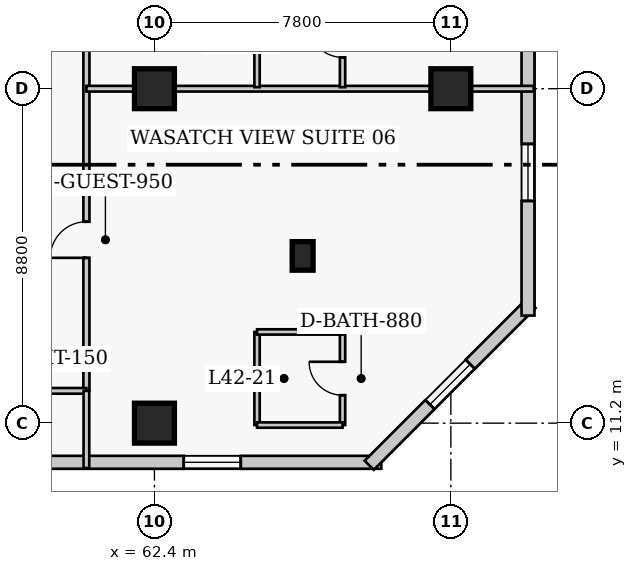
"""IFC4 building model, lengths in metres.
Left out: names, types, materials, properties, quantities, classifications, styles, units other than length and angle.
Written with IfcOpenShell. Run it as: python <this file> out.ifc"""

import sys

from ifc_helpers import new_model, si_unit, direction, frame, frame_2d, origin, origin_2d, place, context, subcontext, project, spatial, rectangle, extrude, element, fill, save


model = new_model("IFC4")
c1 = context("Model", 3, precision=1e-05, world=origin(), true_north=direction((0.0, 1.0)))
c2 = subcontext(c1, "Body", "Model", "MODEL_VIEW")
j1 = project(units=[si_unit("LENGTHUNIT", "METRE"), si_unit("PLANEANGLEUNIT", "RADIAN")], contexts=[c1])
p1 = place(None, origin())
s1 = spatial("IfcSite", under=j1, at=p1, CompositionType="ELEMENT")
p2 = place(p1, origin())
s2 = spatial("IfcBuilding", under=s1, at=p2, CompositionType="ELEMENT")
p3 = place(p2, frame((0.0, 0.0, 168.8)))
s3 = spatial("IfcBuildingStorey", under=s2, at=p3, CompositionType="ELEMENT", Elevation=168.8)
for number, where, z_axis, x_axis in (
    (1, (62.4, 11.2, 0.0), (0.0, 0.0, 1.0), (1.0, 0.0, 0.0)),
    (2, (62.4, 20.0, 0.0), (0.0, 0.0, 1.0), (1.0, 0.0, 0.0)),
    (3, (70.2, 20.0, 0.0), (0.0, 0.0, 1.0), (1.0, 0.0, 0.0)),
):
    element("IfcColumn", number, at=place(p3, frame(where, z_axis=z_axis, x_axis=x_axis)), inside=s3, PredefinedType="COLUMN", context=c2, shape_type="SweptSolid", body=[
        extrude(rectangle(XDim=1.05, YDim=1.05, at=origin_2d()), origin(), (0.0, 0.0, 1.0), 3.8),
    ])
p4 = place(p3, frame((66.3, 15.6, 0.0), z_axis=(0.0, 0.0, 1.0), x_axis=(1.0, 0.0, 0.0)))
e4 = element("IfcColumn", 4, at=p4, inside=s3, PredefinedType="PILASTER", context=c2, shape_type="SweptSolid", body=[
    extrude(rectangle(XDim=0.55, YDim=0.75, at=origin_2d()), origin(), (0.0, 0.0, 1.0), 3.8),
])
p5 = place(p3, frame((41.68, 10.17, 0.0), z_axis=(0.0, 0.0, 1.0), x_axis=(1.0, 0.0, 0.0)))
e5 = element("IfcWall", 5, at=p5, inside=s3, PredefinedType="SOLIDWALL", context=c2, shape_type="SweptSolid", body=[
    extrude(rectangle(XDim=26.69, YDim=0.34, at=frame_2d((13.345, 0.0))), origin(), (0.0, 0.0, 1.0), 3.55),
])
p6 = place(p5, frame((2.548, 0.0, 0.85)))
e6 = element("IfcOpeningElement", 6, at=p6, cuts=e5, PredefinedType="OPENING", context=c2, shape_type="SweptSolid", body=[
    extrude(rectangle(XDim=1.5, YDim=1.75, at=frame_2d((0.75, 0.875))), frame((0.0, 0.18, 0.0), z_axis=(0.0, -1.0, 0.0), x_axis=(1.0, 0.0, 0.0)), (0.0, 0.0, 1.0), 0.36),
])
p7 = place(p5, frame((13.745, 0.0, 0.85)))
e7 = element("IfcOpeningElement", 7, at=p7, cuts=e5, PredefinedType="OPENING", context=c2, shape_type="SweptSolid", body=[
    extrude(rectangle(XDim=1.5, YDim=1.75, at=frame_2d((0.75, 0.875))), frame((0.0, 0.18, 0.0), z_axis=(0.0, -1.0, 0.0), x_axis=(1.0, 0.0, 0.0)), (0.0, 0.0, 1.0), 0.36),
])
p8 = place(p5, frame((21.492, 0.0, 0.85)))
e8 = element("IfcOpeningElement", 8, at=p8, cuts=e5, PredefinedType="OPENING", context=c2, shape_type="SweptSolid", body=[
    extrude(rectangle(XDim=1.5, YDim=1.75, at=frame_2d((0.75, 0.875))), frame((0.0, 0.18, 0.0), z_axis=(0.0, -1.0, 0.0), x_axis=(1.0, 0.0, 0.0)), (0.0, 0.0, 1.0), 0.36),
])
p9 = place(p3, frame((68.052, 10.092, 0.0), z_axis=(0.0, 0.0, 1.0), x_axis=(0.707106781187, 0.707106781187, 0.0)))
e9 = element("IfcWall", 9, at=p9, inside=s3, PredefinedType="SOLIDWALL", context=c2, shape_type="SweptSolid", body=[
    extrude(rectangle(XDim=6.02, YDim=0.34, at=frame_2d((3.01, 0.0))), origin(), (0.0, 0.0, 1.0), 3.55),
])
p10 = place(p9, frame((2.26, 0.0, 0.85)))
e10 = element("IfcOpeningElement", 10, at=p10, cuts=e9, PredefinedType="OPENING", context=c2, shape_type="SweptSolid", body=[
    extrude(rectangle(XDim=1.5, YDim=1.75, at=frame_2d((0.75, 0.875))), frame((0.0, 0.18, 0.0), z_axis=(0.0, -1.0, 0.0), x_axis=(1.0, 0.0, 0.0)), (0.0, 0.0, 1.0), 0.36),
])
p11 = place(p3, frame((72.23, 14.03, 0.0), z_axis=(0.0, 0.0, 1.0), x_axis=(0.0, 1.0, 0.0)))
e11 = element("IfcWall", 11, at=p11, inside=s3, PredefinedType="SOLIDWALL", context=c2, shape_type="SweptSolid", body=[
    extrude(rectangle(XDim=30.14, YDim=0.34, at=frame_2d((15.07, 0.0))), origin(), (0.0, 0.0, 1.0), 3.55),
])
p12 = place(p11, frame((3.018, 0.0, 0.85)))
e12 = element("IfcOpeningElement", 12, at=p12, cuts=e11, PredefinedType="OPENING", context=c2, shape_type="SweptSolid", body=[
    extrude(rectangle(XDim=1.5, YDim=1.75, at=frame_2d((0.75, 0.875))), frame((0.0, 0.18, 0.0), z_axis=(0.0, -1.0, 0.0), x_axis=(1.0, 0.0, 0.0)), (0.0, 0.0, 1.0), 0.36),
])
p13 = place(p11, frame((10.552, 0.0, 0.85)))
e13 = element("IfcOpeningElement", 13, at=p13, cuts=e11, PredefinedType="OPENING", context=c2, shape_type="SweptSolid", body=[
    extrude(rectangle(XDim=1.5, YDim=1.75, at=frame_2d((0.75, 0.875))), frame((0.0, 0.18, 0.0), z_axis=(0.0, -1.0, 0.0), x_axis=(1.0, 0.0, 0.0)), (0.0, 0.0, 1.0), 0.36),
])
p14 = place(p11, frame((18.087, 0.0, 0.85)))
e14 = element("IfcOpeningElement", 14, at=p14, cuts=e11, PredefinedType="OPENING", context=c2, shape_type="SweptSolid", body=[
    extrude(rectangle(XDim=1.5, YDim=1.75, at=frame_2d((0.75, 0.875))), frame((0.0, 0.18, 0.0), z_axis=(0.0, -1.0, 0.0), x_axis=(1.0, 0.0, 0.0)), (0.0, 0.0, 1.0), 0.36),
])
p15 = place(p11, frame((25.623, 0.0, 0.85)))
e15 = element("IfcOpeningElement", 15, at=p15, cuts=e11, PredefinedType="OPENING", context=c2, shape_type="SweptSolid", body=[
    extrude(rectangle(XDim=1.5, YDim=1.75, at=frame_2d((0.75, 0.875))), frame((0.0, 0.18, 0.0), z_axis=(0.0, -1.0, 0.0), x_axis=(1.0, 0.0, 0.0)), (0.0, 0.0, 1.0), 0.36),
])
p16 = place(p3, frame((60.61, 12.05, 0.0), z_axis=(0.0, 0.0, 1.0), x_axis=(0.0, 1.0, 0.0)))
e16 = element("IfcWall", 16, at=p16, inside=s3, PredefinedType="PARTITIONING", context=c2, shape_type="SweptSolid", body=[
    extrude(rectangle(XDim=28.6, YDim=0.16, at=frame_2d((14.3, 0.0))), origin(), (0.0, 0.0, 1.0), 3.55),
])
p17 = place(p16, frame((3.5, 0.0, 0.0)))
e17 = element("IfcOpeningElement", 17, at=p17, cuts=e16, PredefinedType="OPENING", context=c2, shape_type="SweptSolid", body=[
    extrude(rectangle(XDim=0.95, YDim=2.1, at=frame_2d((0.475, 1.05))), frame((0.0, 0.09, 0.0), z_axis=(0.0, -1.0, 0.0), x_axis=(1.0, 0.0, 0.0)), (0.0, 0.0, 1.0), 0.18),
])
p18 = place(p16, frame((11.875, 0.0, 0.0)))
e18 = element("IfcOpeningElement", 18, at=p18, cuts=e16, PredefinedType="OPENING", context=c2, shape_type="SweptSolid", body=[
    extrude(rectangle(XDim=0.95, YDim=2.1, at=frame_2d((0.475, 1.05))), frame((0.0, 0.09, 0.0), z_axis=(0.0, -1.0, 0.0), x_axis=(1.0, 0.0, 0.0)), (0.0, 0.0, 1.0), 0.18),
])
p19 = place(p16, frame((20.325, 0.0, 0.0)))
e19 = element("IfcOpeningElement", 19, at=p19, cuts=e16, PredefinedType="OPENING", context=c2, shape_type="SweptSolid", body=[
    extrude(rectangle(XDim=0.95, YDim=2.1, at=frame_2d((0.475, 1.05))), frame((0.0, 0.09, 0.0), z_axis=(0.0, -1.0, 0.0), x_axis=(1.0, 0.0, 0.0)), (0.0, 0.0, 1.0), 0.18),
])
p20 = place(p16, frame((27.16, 0.0, 0.0)))
e20 = element("IfcOpeningElement", 20, at=p20, cuts=e16, PredefinedType="OPENING", context=c2, shape_type="SweptSolid", body=[
    extrude(rectangle(XDim=1.0, YDim=2.15, at=frame_2d((0.5, 1.075))), frame((0.0, 0.09, 0.0), z_axis=(0.0, -1.0, 0.0), x_axis=(1.0, 0.0, 0.0)), (0.0, 0.0, 1.0), 0.18),
])
p21 = place(p3, frame((58.39, 12.05, 0.0), z_axis=(0.0, 0.0, 1.0), x_axis=(1.0, 0.0, 0.0)))
e21 = element("IfcWall", 21, at=p21, inside=s3, PredefinedType="PARTITIONING", context=c2, shape_type="SweptSolid", body=[
    extrude(rectangle(XDim=2.22, YDim=0.15, at=frame_2d((1.11, 0.0))), origin(), (0.0, 0.0, 1.0), 3.55),
])
p22 = place(p3, frame((60.61, 10.02, 0.0), z_axis=(0.0, 0.0, 1.0), x_axis=(0.0, 1.0, 0.0)))
e22 = element("IfcWall", 22, at=p22, inside=s3, PredefinedType="PARTITIONING", context=c2, shape_type="SweptSolid", body=[
    extrude(rectangle(XDim=2.03, YDim=0.15, at=frame_2d((1.015, 0.0))), origin(), (0.0, 0.0, 1.0), 3.55),
])
p23 = place(p3, frame((65.1, 11.15, 0.0), z_axis=(0.0, 0.0, 1.0), x_axis=(0.0, 1.0, 0.0)))
e23 = element("IfcWall", 23, at=p23, inside=s3, PredefinedType="PLUMBINGWALL", context=c2, shape_type="SweptSolid", body=[
    extrude(rectangle(XDim=2.45, YDim=0.14, at=frame_2d((1.225, 0.0))), origin(), (0.0, 0.0, 1.0), 3.55),
])
p24 = place(p3, frame((67.35, 11.15, 0.0), z_axis=(0.0, 0.0, 1.0), x_axis=(0.0, 1.0, 0.0)))
e24 = element("IfcWall", 24, at=p24, inside=s3, PredefinedType="PLUMBINGWALL", context=c2, shape_type="SweptSolid", body=[
    extrude(rectangle(XDim=2.45, YDim=0.14, at=frame_2d((1.225, 0.0))), origin(), (0.0, 0.0, 1.0), 3.55),
])
p25 = place(p24, frame((0.785, 0.0, 0.0)))
e25 = element("IfcOpeningElement", 25, at=p25, cuts=e24, PredefinedType="OPENING", context=c2, shape_type="SweptSolid", body=[
    extrude(rectangle(XDim=0.88, YDim=2.05, at=frame_2d((0.44, 1.025))), frame((0.0, 0.08, 0.0), z_axis=(0.0, -1.0, 0.0), x_axis=(1.0, 0.0, 0.0)), (0.0, 0.0, 1.0), 0.16),
])
for number, where, z_axis, x_axis in (
    (26, (65.1, 11.15, 0.0), (0.0, 0.0, 1.0), (1.0, 0.0, 0.0)),
    (27, (65.1, 13.6, 0.0), (0.0, 0.0, 1.0), (1.0, 0.0, 0.0)),
):
    element("IfcWall", number, at=place(p3, frame(where, z_axis=z_axis, x_axis=x_axis)), inside=s3, PredefinedType="PLUMBINGWALL", context=c2, shape_type="SweptSolid", body=[
        extrude(rectangle(XDim=2.25, YDim=0.14, at=frame_2d((1.125, 0.0))), origin(), (0.0, 0.0, 1.0), 3.55),
    ])
p26 = place(p3, frame((60.61, 20.0, 0.0), z_axis=(0.0, 0.0, 1.0), x_axis=(1.0, 0.0, 0.0)))
e28 = element("IfcWall", 28, at=p26, inside=s3, PredefinedType="PARTITIONING", context=c2, shape_type="SweptSolid", body=[
    extrude(rectangle(XDim=11.77, YDim=0.15, at=frame_2d((5.885, 0.0))), origin(), (0.0, 0.0, 1.0), 2.778),
])
p27 = place(p3, frame((65.1, 20.04, 0.0), z_axis=(0.0, 0.0, 1.0), x_axis=(0.0, 1.0, 0.0)))
e29 = element("IfcWall", 29, at=p27, inside=s3, PredefinedType="PLUMBINGWALL", context=c2, shape_type="SweptSolid", body=[
    extrude(rectangle(XDim=2.45, YDim=0.14, at=frame_2d((1.225, 0.0))), origin(), (0.0, 0.0, 1.0), 3.55),
])
p28 = place(p3, frame((67.35, 20.04, 0.0), z_axis=(0.0, 0.0, 1.0), x_axis=(0.0, 1.0, 0.0)))
e30 = element("IfcWall", 30, at=p28, inside=s3, PredefinedType="PLUMBINGWALL", context=c2, shape_type="SweptSolid", body=[
    extrude(rectangle(XDim=2.45, YDim=0.14, at=frame_2d((1.225, 0.0))), origin(), (0.0, 0.0, 1.0), 3.55),
])
p29 = place(p28, frame((0.785, 0.0, 0.0)))
e31 = element("IfcOpeningElement", 31, at=p29, cuts=e30, PredefinedType="OPENING", context=c2, shape_type="SweptSolid", body=[
    extrude(rectangle(XDim=0.88, YDim=2.05, at=frame_2d((0.44, 1.025))), frame((0.0, 0.08, 0.0), z_axis=(0.0, -1.0, 0.0), x_axis=(1.0, 0.0, 0.0)), (0.0, 0.0, 1.0), 0.16),
])
p30 = place(p8, origin())
e32 = element("IfcWindow", 32, at=p30, inside=s3, PartitioningType="SINGLE_PANEL", PredefinedType="WINDOW", context=c2, shape_type="SweptSolid", body=[
    extrude(rectangle(XDim=1.5, YDim=1.75, at=frame_2d((0.75, 0.875))), frame((0.0, 0.03, 0.0), z_axis=(0.0, -1.0, 0.0), x_axis=(1.0, 0.0, 0.0)), (0.0, 0.0, 1.0), 0.06),
])
fill(e8, e32)
p31 = place(p10, origin())
e33 = element("IfcWindow", 33, at=p31, inside=s3, PartitioningType="SINGLE_PANEL", PredefinedType="WINDOW", context=c2, shape_type="SweptSolid", body=[
    extrude(rectangle(XDim=1.5, YDim=1.75, at=frame_2d((0.75, 0.875))), frame((0.0, 0.03, 0.0), z_axis=(0.0, -1.0, 0.0), x_axis=(1.0, 0.0, 0.0)), (0.0, 0.0, 1.0), 0.06),
])
fill(e10, e33)
p32 = place(p12, origin())
e34 = element("IfcWindow", 34, at=p32, inside=s3, PartitioningType="SINGLE_PANEL", PredefinedType="WINDOW", context=c2, shape_type="SweptSolid", body=[
    extrude(rectangle(XDim=1.5, YDim=1.75, at=frame_2d((0.75, 0.875))), frame((0.0, 0.03, 0.0), z_axis=(0.0, -1.0, 0.0), x_axis=(1.0, 0.0, 0.0)), (0.0, 0.0, 1.0), 0.06),
])
fill(e12, e34)
p33 = place(p25, origin())
e35 = element("IfcDoor", 35, at=p33, inside=s3, OperationType="SINGLE_SWING_RIGHT", PredefinedType="DOOR", context=c2, shape_type="SweptSolid", body=[
    extrude(rectangle(XDim=0.88, YDim=2.05, at=frame_2d((0.44, 1.025))), frame((0.0, 0.025, 0.0), z_axis=(0.0, -1.0, 0.0), x_axis=(1.0, 0.0, 0.0)), (0.0, 0.0, 1.0), 0.05),
])
fill(e25, e35)
p34 = place(p17, origin())
e36 = element("IfcDoor", 36, at=p34, inside=s3, OperationType="SINGLE_SWING_LEFT", PredefinedType="DOOR", context=c2, shape_type="SweptSolid", body=[
    extrude(rectangle(XDim=0.95, YDim=2.1, at=frame_2d((0.475, 1.05))), frame((0.0, 0.025, 0.0), z_axis=(0.0, -1.0, 0.0), x_axis=(1.0, 0.0, 0.0)), (0.0, 0.0, 1.0), 0.05),
])
fill(e17, e36)
p35 = place(p29, origin())
e37 = element("IfcDoor", 37, at=p35, inside=s3, OperationType="SINGLE_SWING_RIGHT", PredefinedType="DOOR", context=c2, shape_type="SweptSolid", body=[
    extrude(rectangle(XDim=0.88, YDim=2.05, at=frame_2d((0.44, 1.025))), frame((0.0, 0.025, 0.0), z_axis=(0.0, -1.0, 0.0), x_axis=(1.0, 0.0, 0.0)), (0.0, 0.0, 1.0), 0.05),
])
fill(e31, e37)
save(model, sys.argv[1])
